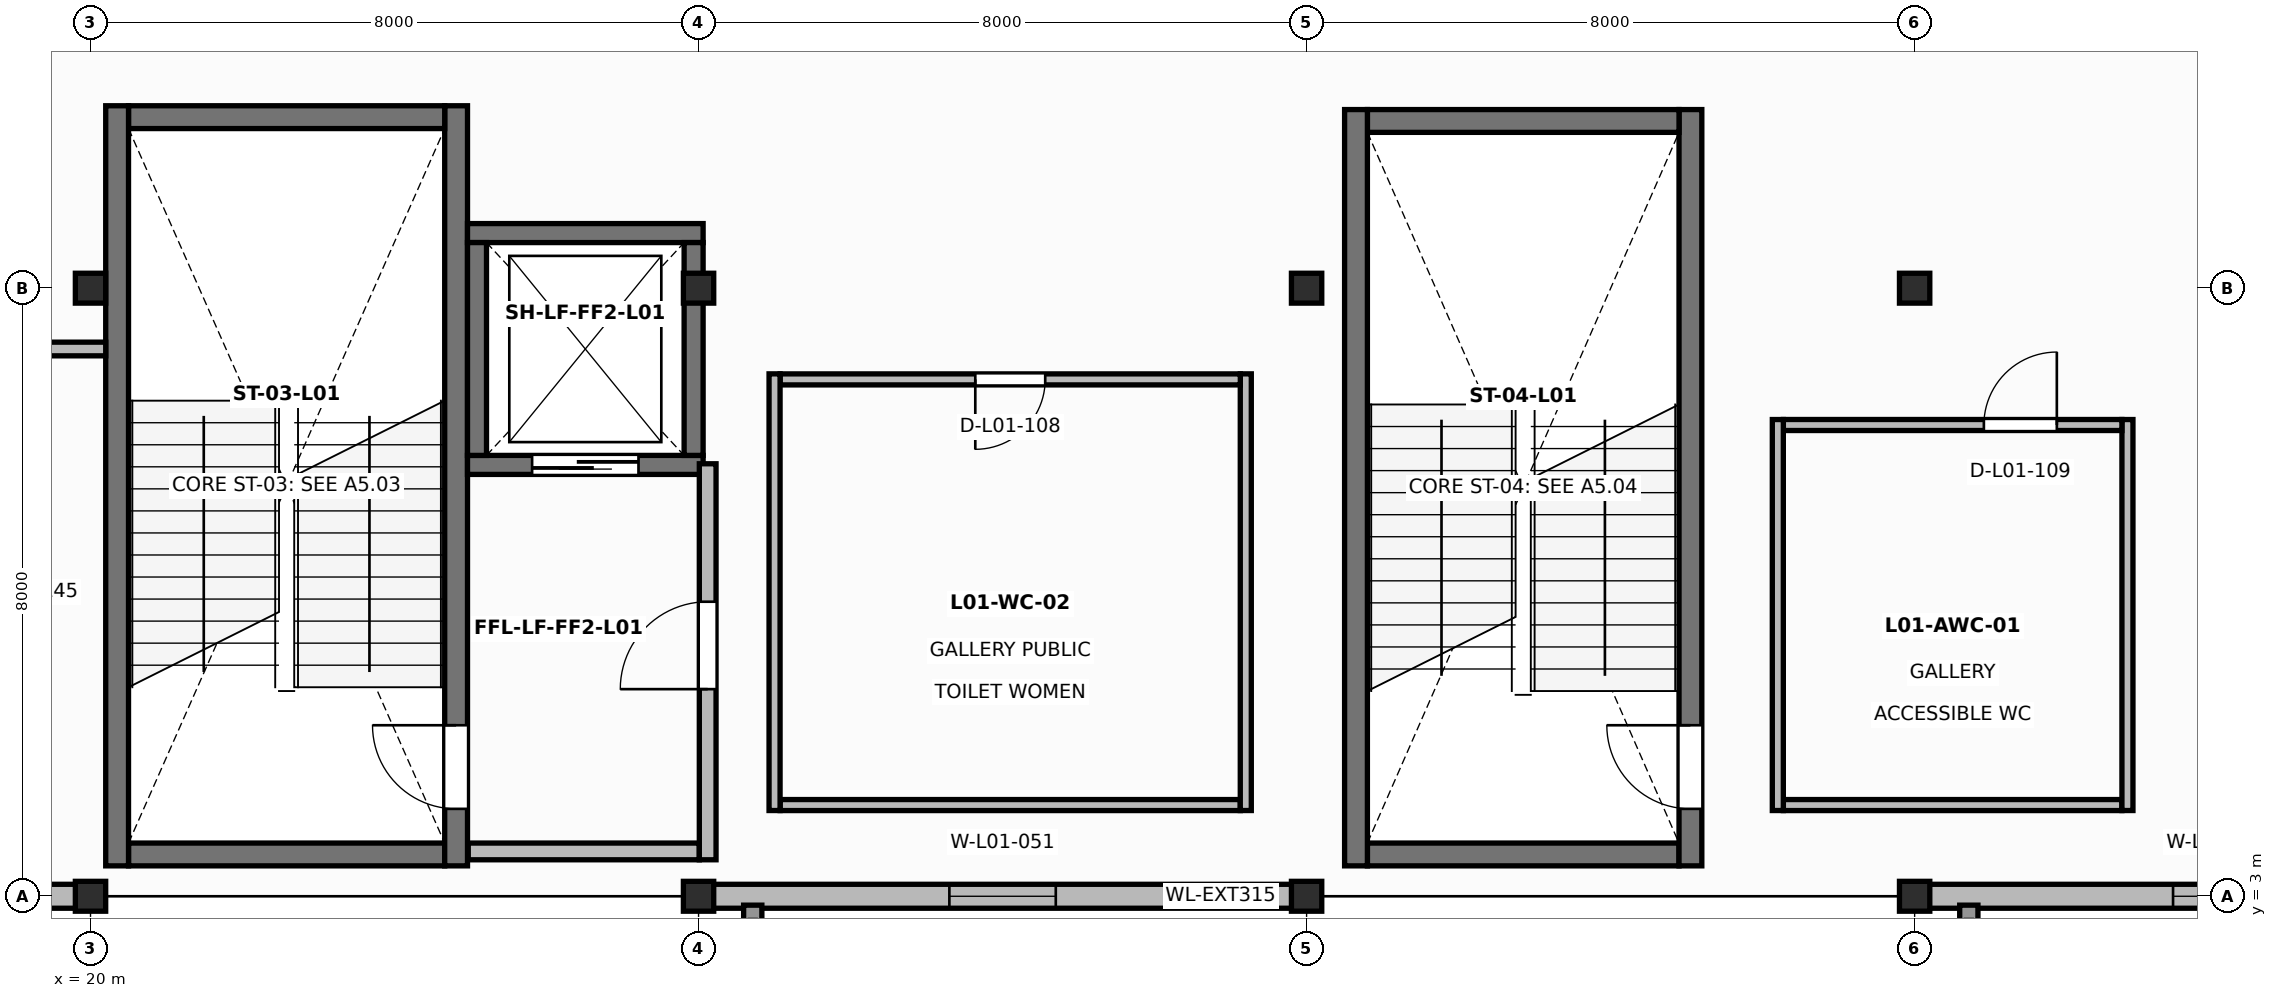
"""IFC4 building model, lengths in metres.
Left out: names, types, materials, properties, quantities, classifications, styles, units other than length and angle.
Written with IfcOpenShell. Run it as: python <this file> out.ifc"""

import sys

from ifc_helpers import new_model, si_unit, direction, frame, frame_2d, origin, origin_2d, place, context, subcontext, project, spatial, rectangle, i_section, extrude, element, fill, save


model = new_model("IFC4")
c1 = context("Model", 3, precision=1e-05, world=origin(), true_north=direction((0.0, 1.0)))
c2 = subcontext(c1, "Body", "Model", "MODEL_VIEW")
j1 = project(units=[si_unit("LENGTHUNIT", "METRE"), si_unit("PLANEANGLEUNIT", "RADIAN")], contexts=[c1])
p1 = place(None, origin())
s1 = spatial("IfcSite", under=j1, at=p1, CompositionType="ELEMENT")
p2 = place(p1, origin())
s2 = spatial("IfcBuilding", under=s1, at=p2, CompositionType="ELEMENT")
p3 = place(p2, frame((0.0, 0.0, 6.0)))
s3 = spatial("IfcBuildingStorey", under=s2, at=p3, CompositionType="ELEMENT", Elevation=6.0)
for number, where, z_axis, x_axis in (
    (1, (20.0, 3.0, 0.0), (0.0, 0.0, 1.0), (1.0, 0.0, 0.0)),
    (2, (20.0, 11.0, 0.0), (0.0, 0.0, 1.0), (1.0, 0.0, 0.0)),
    (3, (28.0, 3.0, 0.0), (0.0, 0.0, 1.0), (1.0, 0.0, 0.0)),
    (4, (28.0, 11.0, 0.0), (0.0, 0.0, 1.0), (1.0, 0.0, 0.0)),
    (5, (36.0, 3.0, 0.0), (0.0, 0.0, 1.0), (1.0, 0.0, 0.0)),
    (6, (36.0, 11.0, 0.0), (0.0, 0.0, 1.0), (1.0, 0.0, 0.0)),
    (7, (44.0, 3.0, 0.0), (0.0, 0.0, 1.0), (1.0, 0.0, 0.0)),
    (8, (44.0, 11.0, 0.0), (0.0, 0.0, 1.0), (1.0, 0.0, 0.0)),
):
    element("IfcColumn", number, at=place(p3, frame(where, z_axis=z_axis, x_axis=x_axis)), inside=s3, PredefinedType="COLUMN", context=c2, shape_type="SweptSolid", body=[
        extrude(i_section(OverallWidth=0.399, OverallDepth=0.393, WebThickness=0.023, FlangeThickness=0.037, at=origin_2d()), origin(), (0.0, 0.0, 1.0), 5.2),
    ])
p4 = place(p3, frame((20.5, 3.55, 0.0), z_axis=(0.0, 0.0, 1.0), x_axis=(1.0, 0.0, 0.0)))
e9 = element("IfcWall", 9, at=p4, inside=s3, PredefinedType="SHEAR", context=c2, shape_type="SweptSolid", body=[
    extrude(rectangle(XDim=4.16, YDim=0.3, at=frame_2d((2.08, 0.0))), origin(), (0.0, 0.0, 1.0), 4.945),
])
p5 = place(p3, frame((24.81, 3.4, 0.0), z_axis=(0.0, 0.0, 1.0), x_axis=(0.0, 1.0, 0.0)))
e10 = element("IfcWall", 10, at=p5, inside=s3, PredefinedType="SHEAR", context=c2, shape_type="SweptSolid", body=[
    extrude(rectangle(XDim=10.0, YDim=0.3, at=frame_2d((5.0, 0.0))), origin(), (0.0, 0.0, 1.0), 4.945),
])
p6 = place(p5, frame((0.75, 0.0, 0.0)))
e11 = element("IfcOpeningElement", 11, at=p6, cuts=e10, PredefinedType="OPENING", context=c2, shape_type="SweptSolid", body=[
    extrude(rectangle(XDim=1.1, YDim=2.15, at=frame_2d((0.55, 1.075))), frame((0.0, 0.16, 0.0), z_axis=(0.0, -1.0, 0.0), x_axis=(1.0, 0.0, 0.0)), (0.0, 0.0, 1.0), 0.32),
])
p7 = place(p3, frame((24.66, 13.25, 0.0), z_axis=(0.0, 0.0, 1.0), x_axis=(-1.0, 0.0, 0.0)))
e12 = element("IfcWall", 12, at=p7, inside=s3, PredefinedType="SHEAR", context=c2, shape_type="SweptSolid", body=[
    extrude(rectangle(XDim=4.16, YDim=0.3, at=frame_2d((2.08, 0.0))), origin(), (0.0, 0.0, 1.0), 4.945),
])
p8 = place(p3, frame((20.35, 13.4, 0.0), z_axis=(0.0, 0.0, 1.0), x_axis=(0.0, -1.0, 0.0)))
e13 = element("IfcWall", 13, at=p8, inside=s3, PredefinedType="SHEAR", context=c2, shape_type="SweptSolid", body=[
    extrude(rectangle(XDim=10.0, YDim=0.3, at=frame_2d((5.0, 0.0))), origin(), (0.0, 0.0, 1.0), 4.945),
])
p9 = place(p3, frame((36.8, 3.55, 0.0), z_axis=(0.0, 0.0, 1.0), x_axis=(1.0, 0.0, 0.0)))
e14 = element("IfcWall", 14, at=p9, inside=s3, PredefinedType="SHEAR", context=c2, shape_type="SweptSolid", body=[
    extrude(rectangle(XDim=4.1, YDim=0.3, at=frame_2d((2.05, 0.0))), origin(), (0.0, 0.0, 1.0), 4.945),
])
p10 = place(p3, frame((41.05, 3.4, 0.0), z_axis=(0.0, 0.0, 1.0), x_axis=(0.0, 1.0, 0.0)))
e15 = element("IfcWall", 15, at=p10, inside=s3, PredefinedType="SHEAR", context=c2, shape_type="SweptSolid", body=[
    extrude(rectangle(XDim=9.95, YDim=0.3, at=frame_2d((4.975, 0.0))), origin(), (0.0, 0.0, 1.0), 4.945),
])
p11 = place(p10, frame((0.75, 0.0, 0.0)))
e16 = element("IfcOpeningElement", 16, at=p11, cuts=e15, PredefinedType="OPENING", context=c2, shape_type="SweptSolid", body=[
    extrude(rectangle(XDim=1.1, YDim=2.15, at=frame_2d((0.55, 1.075))), frame((0.0, 0.16, 0.0), z_axis=(0.0, -1.0, 0.0), x_axis=(1.0, 0.0, 0.0)), (0.0, 0.0, 1.0), 0.32),
])
p12 = place(p3, frame((40.9, 13.2, 0.0), z_axis=(0.0, 0.0, 1.0), x_axis=(-1.0, 0.0, 0.0)))
e17 = element("IfcWall", 17, at=p12, inside=s3, PredefinedType="SHEAR", context=c2, shape_type="SweptSolid", body=[
    extrude(rectangle(XDim=4.1, YDim=0.3, at=frame_2d((2.05, 0.0))), origin(), (0.0, 0.0, 1.0), 4.945),
])
p13 = place(p3, frame((36.65, 13.35, 0.0), z_axis=(0.0, 0.0, 1.0), x_axis=(0.0, -1.0, 0.0)))
e18 = element("IfcWall", 18, at=p13, inside=s3, PredefinedType="SHEAR", context=c2, shape_type="SweptSolid", body=[
    extrude(rectangle(XDim=9.95, YDim=0.3, at=frame_2d((4.975, 0.0))), origin(), (0.0, 0.0, 1.0), 4.945),
])
p14 = place(p3, frame((24.96, 8.675, 0.0), z_axis=(0.0, 0.0, 1.0), x_axis=(1.0, 0.0, 0.0)))
e19 = element("IfcWall", 19, at=p14, inside=s3, PredefinedType="SOLIDWALL", context=c2, shape_type="SweptSolid", body=[
    extrude(rectangle(XDim=3.1, YDim=0.25, at=frame_2d((1.55, 0.0))), origin(), (0.0, 0.0, 1.0), 4.945),
])
p15 = place(p14, frame((0.85, 0.0, 0.0)))
e20 = element("IfcOpeningElement", 20, at=p15, cuts=e19, PredefinedType="OPENING", context=c2, shape_type="SweptSolid", body=[
    extrude(rectangle(XDim=1.4, YDim=2.25, at=frame_2d((0.7, 1.125))), frame((0.0, 0.135, 0.0), z_axis=(0.0, -1.0, 0.0), x_axis=(1.0, 0.0, 0.0)), (0.0, 0.0, 1.0), 0.27),
])
p16 = place(p3, frame((28.06, 11.725, 0.0), z_axis=(0.0, 0.0, 1.0), x_axis=(-1.0, 0.0, 0.0)))
e21 = element("IfcWall", 21, at=p16, inside=s3, PredefinedType="SOLIDWALL", context=c2, shape_type="SweptSolid", body=[
    extrude(rectangle(XDim=3.1, YDim=0.25, at=frame_2d((1.55, 0.0))), origin(), (0.0, 0.0, 1.0), 4.945),
])
for number, where, z_axis, x_axis in (
    (22, (27.935, 8.8, 0.0), (0.0, 0.0, 1.0), (0.0, 1.0, 0.0)),
    (23, (25.085, 11.6, 0.0), (0.0, 0.0, 1.0), (0.0, -1.0, 0.0)),
):
    element("IfcWall", number, at=place(p3, frame(where, z_axis=z_axis, x_axis=x_axis)), inside=s3, PredefinedType="SOLIDWALL", context=c2, shape_type="SweptSolid", body=[
        extrude(rectangle(XDim=2.8, YDim=0.25, at=frame_2d((1.4, 0.0))), origin(), (0.0, 0.0, 1.0), 4.945),
    ])
p17 = place(p3, frame((24.97, 3.59, 0.0), z_axis=(0.0, 0.0, 1.0), x_axis=(1.0, 0.0, 0.0)))
e24 = element("IfcWall", 24, at=p17, inside=s3, PredefinedType="SOLIDWALL", context=c2, shape_type="SweptSolid", body=[
    extrude(rectangle(XDim=3.04, YDim=0.22, at=frame_2d((1.52, 0.0))), origin(), (0.0, 0.0, 1.0), 4.945),
])
p18 = place(p3, frame((28.12, 3.48, 0.0), z_axis=(0.0, 0.0, 1.0), x_axis=(0.0, 1.0, 0.0)))
e25 = element("IfcWall", 25, at=p18, inside=s3, PredefinedType="SOLIDWALL", context=c2, shape_type="SweptSolid", body=[
    extrude(rectangle(XDim=5.21, YDim=0.22, at=frame_2d((2.605, 0.0))), origin(), (0.0, 0.0, 1.0), 4.327),
])
p19 = place(p18, frame((2.245, 0.0, 0.0)))
e26 = element("IfcOpeningElement", 26, at=p19, cuts=e25, PredefinedType="OPENING", context=c2, shape_type="SweptSolid", body=[
    extrude(rectangle(XDim=1.15, YDim=2.15, at=frame_2d((0.575, 1.075))), frame((0.0, 0.12, 0.0), z_axis=(0.0, -1.0, 0.0), x_axis=(1.0, 0.0, 0.0)), (0.0, 0.0, 1.0), 0.24),
])
p20 = place(p3, frame((12.013, 3.0, 0.0), z_axis=(0.0, 0.0, 1.0), x_axis=(1.0, 0.0, 0.0)))
e27 = element("IfcWall", 27, at=p20, inside=s3, PredefinedType="SOLIDWALL", context=c2, shape_type="SweptSolid", body=[
    extrude(rectangle(XDim=7.974, YDim=0.315, at=frame_2d((3.987, 0.0))), origin(), (0.0, 0.0, 1.0), 4.3),
])
p21 = place(p20, frame((3.237, 0.0, 0.85)))
e28 = element("IfcOpeningElement", 28, at=p21, cuts=e27, PredefinedType="OPENING", context=c2, shape_type="SweptSolid", body=[
    extrude(rectangle(XDim=1.5, YDim=1.7, at=frame_2d((0.75, 0.85))), frame((0.0, 0.167, 0.0), z_axis=(0.0, -1.0, 0.0), x_axis=(1.0, 0.0, 0.0)), (0.0, 0.0, 1.0), 0.335),
])
p22 = place(p3, frame((28.013, 3.0, 0.0), z_axis=(0.0, 0.0, 1.0), x_axis=(1.0, 0.0, 0.0)))
e29 = element("IfcWall", 29, at=p22, inside=s3, PredefinedType="SOLIDWALL", context=c2, shape_type="SweptSolid", body=[
    extrude(rectangle(XDim=7.974, YDim=0.315, at=frame_2d((3.987, 0.0))), origin(), (0.0, 0.0, 1.0), 4.3),
])
p23 = place(p22, frame((3.287, 0.0, 0.85)))
e30 = element("IfcOpeningElement", 30, at=p23, cuts=e29, PredefinedType="OPENING", context=c2, shape_type="SweptSolid", body=[
    extrude(rectangle(XDim=1.4, YDim=1.6, at=frame_2d((0.7, 0.8))), frame((0.0, 0.167, 0.0), z_axis=(0.0, -1.0, 0.0), x_axis=(1.0, 0.0, 0.0)), (0.0, 0.0, 1.0), 0.335),
])
p24 = place(p3, frame((44.013, 3.0, 0.0), z_axis=(0.0, 0.0, 1.0), x_axis=(1.0, 0.0, 0.0)))
e31 = element("IfcWall", 31, at=p24, inside=s3, PredefinedType="SOLIDWALL", context=c2, shape_type="SweptSolid", body=[
    extrude(rectangle(XDim=7.974, YDim=0.315, at=frame_2d((3.987, 0.0))), origin(), (0.0, 0.0, 1.0), 4.3),
])
p25 = place(p24, frame((3.387, 0.0, 0.85)))
e32 = element("IfcOpeningElement", 32, at=p25, cuts=e31, PredefinedType="OPENING", context=c2, shape_type="SweptSolid", body=[
    extrude(rectangle(XDim=1.2, YDim=1.5, at=frame_2d((0.6, 0.75))), frame((0.0, 0.167, 0.0), z_axis=(0.0, -1.0, 0.0), x_axis=(1.0, 0.0, 0.0)), (0.0, 0.0, 1.0), 0.335),
])
p26 = place(p3, frame((19.29, 10.2, 0.0), z_axis=(0.0, 0.0, 1.0), x_axis=(1.0, 0.0, 0.0)))
e33 = element("IfcWall", 33, at=p26, inside=s3, PredefinedType="PARTITIONING", context=c2, shape_type="SweptSolid", body=[
    extrude(rectangle(XDim=0.91, YDim=0.18, at=frame_2d((0.455, 0.0))), origin(), (0.0, 0.0, 1.0), 4.327),
])
p27 = place(p3, frame((29.073, 4.2, 0.0), z_axis=(0.0, 0.0, 1.0), x_axis=(1.0, 0.0, 0.0)))
e34 = element("IfcWall", 34, at=p27, inside=s3, PredefinedType="PARTITIONING", context=c2, shape_type="SweptSolid", body=[
    extrude(rectangle(XDim=6.055, YDim=0.145, at=frame_2d((3.027, 0.0))), origin(), (0.0, 0.0, 1.0), 4.87),
])
p28 = place(p3, frame((35.2, 4.128, 0.0), z_axis=(0.0, 0.0, 1.0), x_axis=(0.0, 1.0, 0.0)))
e35 = element("IfcWall", 35, at=p28, inside=s3, PredefinedType="PARTITIONING", context=c2, shape_type="SweptSolid", body=[
    extrude(rectangle(XDim=5.745, YDim=0.145, at=frame_2d((2.873, 0.0))), origin(), (0.0, 0.0, 1.0), 4.87),
])
p29 = place(p3, frame((35.128, 9.8, 0.0), z_axis=(0.0, 0.0, 1.0), x_axis=(-1.0, 0.0, 0.0)))
e36 = element("IfcWall", 36, at=p29, inside=s3, PredefinedType="PARTITIONING", context=c2, shape_type="SweptSolid", body=[
    extrude(rectangle(XDim=6.055, YDim=0.145, at=frame_2d((3.027, 0.0))), origin(), (0.0, 0.0, 1.0), 4.87),
])
p30 = place(p29, frame((2.567, 0.0, 0.0)))
e37 = element("IfcOpeningElement", 37, at=p30, cuts=e36, PredefinedType="OPENING", context=c2, shape_type="SweptSolid", body=[
    extrude(rectangle(XDim=0.92, YDim=2.1, at=frame_2d((0.46, 1.05))), frame((0.0, 0.083, 0.0), z_axis=(0.0, -1.0, 0.0), x_axis=(1.0, 0.0, 0.0)), (0.0, 0.0, 1.0), 0.165),
])
p31 = place(p3, frame((29.0, 9.873, 0.0), z_axis=(0.0, 0.0, 1.0), x_axis=(0.0, -1.0, 0.0)))
e38 = element("IfcWall", 38, at=p31, inside=s3, PredefinedType="PARTITIONING", context=c2, shape_type="SweptSolid", body=[
    extrude(rectangle(XDim=5.745, YDim=0.145, at=frame_2d((2.873, 0.0))), origin(), (0.0, 0.0, 1.0), 4.87),
])
p32 = place(p3, frame((42.273, 4.2, 0.0), z_axis=(0.0, 0.0, 1.0), x_axis=(1.0, 0.0, 0.0)))
e39 = element("IfcWall", 39, at=p32, inside=s3, PredefinedType="PARTITIONING", context=c2, shape_type="SweptSolid", body=[
    extrude(rectangle(XDim=4.454, YDim=0.145, at=frame_2d((2.227, 0.0))), origin(), (0.0, 0.0, 1.0), 4.407),
])
p33 = place(p3, frame((46.8, 4.128, 0.0), z_axis=(0.0, 0.0, 1.0), x_axis=(0.0, 1.0, 0.0)))
e40 = element("IfcWall", 40, at=p33, inside=s3, PredefinedType="PARTITIONING", context=c2, shape_type="SweptSolid", body=[
    extrude(rectangle(XDim=5.144, YDim=0.145, at=frame_2d((2.572, 0.0))), origin(), (0.0, 0.0, 1.0), 4.87),
])
p34 = place(p3, frame((46.727, 9.2, 0.0), z_axis=(0.0, 0.0, 1.0), x_axis=(-1.0, 0.0, 0.0)))
e41 = element("IfcWall", 41, at=p34, inside=s3, PredefinedType="PARTITIONING", context=c2, shape_type="SweptSolid", body=[
    extrude(rectangle(XDim=4.454, YDim=0.145, at=frame_2d((2.227, 0.0))), origin(), (0.0, 0.0, 1.0), 4.407),
])
p35 = place(p34, frame((0.856, 0.0, 0.0)))
e42 = element("IfcOpeningElement", 42, at=p35, cuts=e41, PredefinedType="OPENING", context=c2, shape_type="SweptSolid", body=[
    extrude(rectangle(XDim=0.96, YDim=2.12, at=frame_2d((0.48, 1.06))), frame((0.0, 0.083, 0.0), z_axis=(0.0, -1.0, 0.0), x_axis=(1.0, 0.0, 0.0)), (0.0, 0.0, 1.0), 0.165),
])
p36 = place(p3, frame((42.2, 9.272, 0.0), z_axis=(0.0, 0.0, 1.0), x_axis=(0.0, -1.0, 0.0)))
e43 = element("IfcWall", 43, at=p36, inside=s3, PredefinedType="PARTITIONING", context=c2, shape_type="SweptSolid", body=[
    extrude(rectangle(XDim=5.144, YDim=0.145, at=frame_2d((2.572, 0.0))), origin(), (0.0, 0.0, 1.0), 4.87),
])
p37 = place(p6, origin())
e44 = element("IfcDoor", 44, at=p37, inside=s3, OperationType="SINGLE_SWING_RIGHT", PredefinedType="DOOR", context=c2, shape_type="SweptSolid", body=[
    extrude(rectangle(XDim=1.1, YDim=2.15, at=frame_2d((0.55, 1.075))), frame((0.0, 0.025, 0.0), z_axis=(0.0, -1.0, 0.0), x_axis=(1.0, 0.0, 0.0)), (0.0, 0.0, 1.0), 0.05),
])
fill(e11, e44)
p38 = place(p11, origin())
e45 = element("IfcDoor", 45, at=p38, inside=s3, OperationType="SINGLE_SWING_RIGHT", PredefinedType="DOOR", context=c2, shape_type="SweptSolid", body=[
    extrude(rectangle(XDim=1.1, YDim=2.15, at=frame_2d((0.55, 1.075))), frame((0.0, 0.025, 0.0), z_axis=(0.0, -1.0, 0.0), x_axis=(1.0, 0.0, 0.0)), (0.0, 0.0, 1.0), 0.05),
])
fill(e16, e45)
p39 = place(p15, frame((1.4, 0.0, 0.0), z_axis=(0.0, 0.0, 1.0), x_axis=(-1.0, 0.0, 0.0)))
e46 = element("IfcDoor", 46, at=p39, inside=s3, OperationType="DOUBLE_DOOR_SLIDING", PredefinedType="DOOR", context=c2, shape_type="SweptSolid", body=[
    extrude(rectangle(XDim=1.4, YDim=2.25, at=frame_2d((0.7, 1.125))), frame((0.0, 0.025, 0.0), z_axis=(0.0, -1.0, 0.0), x_axis=(1.0, 0.0, 0.0)), (0.0, 0.0, 1.0), 0.05),
])
fill(e20, e46)
p40 = place(p19, origin())
e47 = element("IfcDoor", 47, at=p40, inside=s3, OperationType="SINGLE_SWING_LEFT", PredefinedType="DOOR", context=c2, shape_type="SweptSolid", body=[
    extrude(rectangle(XDim=1.15, YDim=2.15, at=frame_2d((0.575, 1.075))), frame((0.0, 0.025, 0.0), z_axis=(0.0, -1.0, 0.0), x_axis=(1.0, 0.0, 0.0)), (0.0, 0.0, 1.0), 0.05),
])
fill(e26, e47)
p41 = place(p23, origin())
e48 = element("IfcWindow", 48, at=p41, inside=s3, PartitioningType="SINGLE_PANEL", PredefinedType="WINDOW", context=c2, shape_type="SweptSolid", body=[
    extrude(rectangle(XDim=1.4, YDim=1.6, at=frame_2d((0.7, 0.8))), frame((0.0, 0.03, 0.0), z_axis=(0.0, -1.0, 0.0), x_axis=(1.0, 0.0, 0.0)), (0.0, 0.0, 1.0), 0.06),
])
fill(e30, e48)
p42 = place(p25, origin())
e49 = element("IfcWindow", 49, at=p42, inside=s3, PartitioningType="SINGLE_PANEL", PredefinedType="WINDOW", context=c2, shape_type="SweptSolid", body=[
    extrude(rectangle(XDim=1.2, YDim=1.5, at=frame_2d((0.6, 0.75))), frame((0.0, 0.03, 0.0), z_axis=(0.0, -1.0, 0.0), x_axis=(1.0, 0.0, 0.0)), (0.0, 0.0, 1.0), 0.06),
])
fill(e32, e49)
p43 = place(p30, origin())
e50 = element("IfcDoor", 50, at=p43, inside=s3, OperationType="SINGLE_SWING_RIGHT", PredefinedType="DOOR", context=c2, shape_type="SweptSolid", body=[
    extrude(rectangle(XDim=0.92, YDim=2.1, at=frame_2d((0.46, 1.05))), frame((0.0, 0.025, 0.0), z_axis=(0.0, -1.0, 0.0), x_axis=(1.0, 0.0, 0.0)), (0.0, 0.0, 1.0), 0.05),
])
fill(e37, e50)
p44 = place(p35, frame((0.96, 0.0, 0.0), z_axis=(0.0, 0.0, 1.0), x_axis=(-1.0, 0.0, 0.0)))
e51 = element("IfcDoor", 51, at=p44, inside=s3, OperationType="SINGLE_SWING_LEFT", PredefinedType="DOOR", context=c2, shape_type="SweptSolid", body=[
    extrude(rectangle(XDim=0.96, YDim=2.12, at=frame_2d((0.48, 1.06))), frame((0.0, 0.025, 0.0), z_axis=(0.0, -1.0, 0.0), x_axis=(1.0, 0.0, 0.0)), (0.0, 0.0, 1.0), 0.05),
])
fill(e42, e51)
save(model, sys.argv[1])
